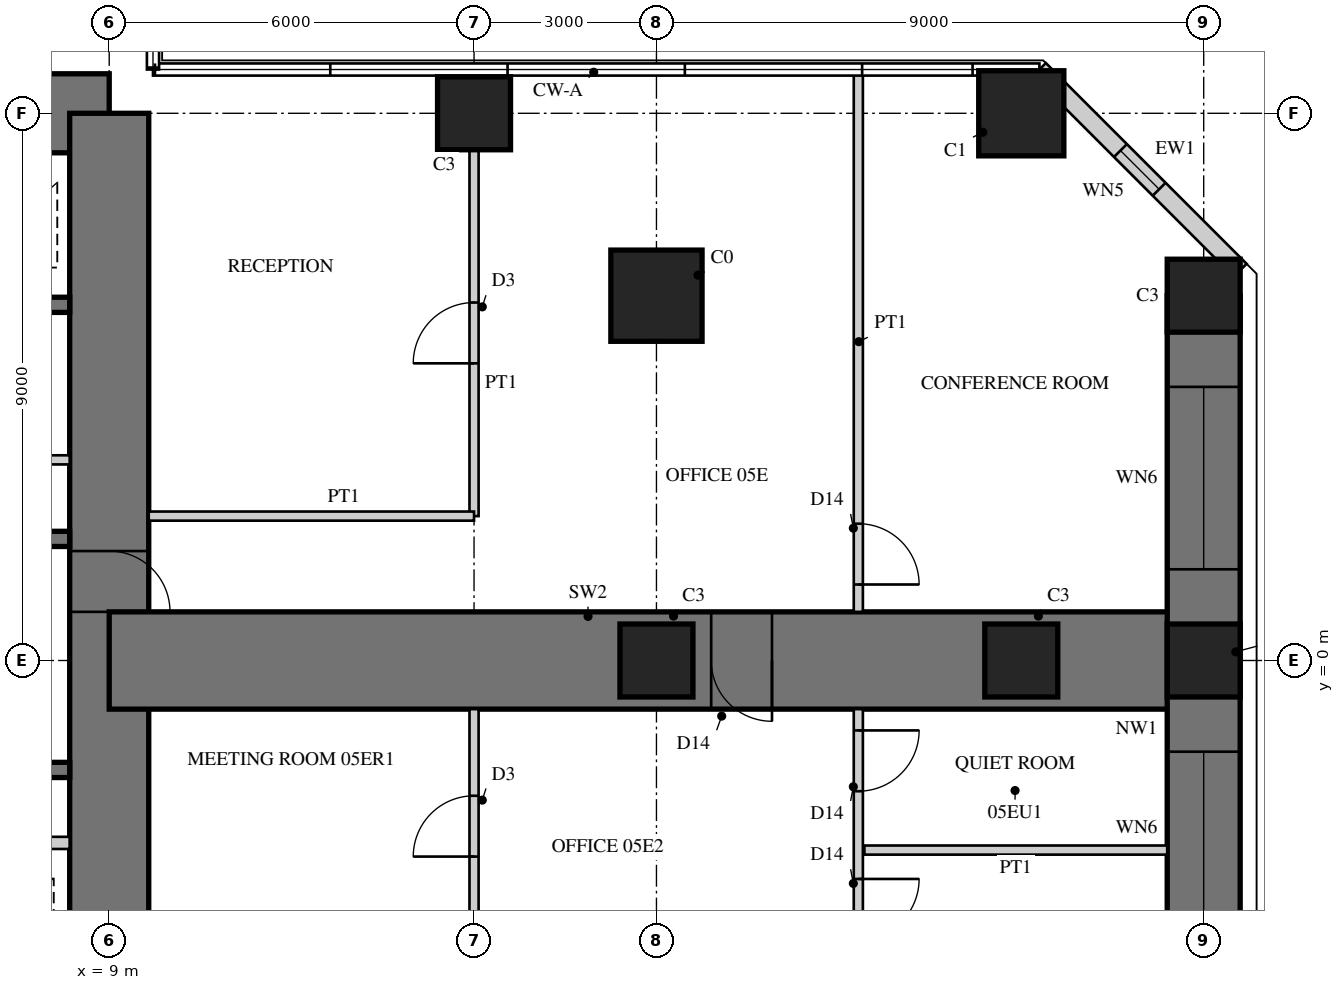
"""IFC4 building model, lengths in metres.
Left out: names, types, materials, properties, quantities, classifications, styles, units other than length and angle.
Written with IfcOpenShell. Run it as: python <this file> out.ifc"""

import sys

from ifc_helpers import new_model, si_unit, direction, frame, frame_2d, origin, origin_2d, place, context, subcontext, project, spatial, rectangle, hollow_rectangle, extrude, element, fill, save


model = new_model("IFC4")
c1 = context("Model", 3, precision=1e-05, world=origin(), true_north=direction((0.0, 1.0)))
c2 = subcontext(c1, "Body", "Model", "MODEL_VIEW")
j1 = project(units=[si_unit("LENGTHUNIT", "METRE"), si_unit("PLANEANGLEUNIT", "RADIAN")], contexts=[c1])
p1 = place(None, origin())
s1 = spatial("IfcSite", under=j1, at=p1, CompositionType="ELEMENT")
p2 = place(p1, origin())
s2 = spatial("IfcBuilding", under=s1, at=p2, CompositionType="ELEMENT")
p3 = place(p2, frame((0.0, 0.0, 23.5)))
s3 = spatial("IfcBuildingStorey", under=s2, at=p3, CompositionType="ELEMENT", Elevation=23.5)
p4 = place(p3, frame((9.0, 9.0, 0.0), z_axis=(0.0, 0.0, 1.0), x_axis=(-1.0, 0.0, 0.0)))
e1 = element("IfcWall", 1, at=p4, inside=s3, PredefinedType="SHEAR", context=c2, shape_type="SweptSolid", body=[
    extrude(rectangle(XDim=18.0, YDim=1.3, at=frame_2d((9.0, 0.0))), origin(), (0.0, 0.0, 1.0), 4.0),
])
p5 = place(p4, frame((9.8, 0.0, 0.0)))
e2 = element("IfcOpeningElement", 2, at=p5, cuts=e1, PredefinedType="OPENING", context=c2, shape_type="SweptSolid", body=[
    extrude(rectangle(XDim=1.0, YDim=2.4, at=frame_2d((0.5, 1.2))), frame((0.0, 0.66, 0.0), z_axis=(0.0, -1.0, 0.0), x_axis=(1.0, 0.0, 0.0)), (0.0, 0.0, 1.0), 1.32),
])
p6 = place(p3, frame((9.0, -9.0, 0.0), z_axis=(0.0, 0.0, 1.0), x_axis=(0.0, 1.0, 0.0)))
e3 = element("IfcWall", 3, at=p6, inside=s3, PredefinedType="SHEAR", context=c2, shape_type="SweptSolid", body=[
    extrude(rectangle(XDim=18.0, YDim=1.3, at=frame_2d((9.0, 0.0))), origin(), (0.0, 0.0, 1.0), 4.0),
])
p7 = place(p6, frame((9.8, 0.0, 0.0)))
e4 = element("IfcOpeningElement", 4, at=p7, cuts=e3, PredefinedType="OPENING", context=c2, shape_type="SweptSolid", body=[
    extrude(rectangle(XDim=1.0, YDim=2.4, at=frame_2d((0.5, 1.2))), frame((0.0, 0.66, 0.0), z_axis=(0.0, -1.0, 0.0), x_axis=(1.0, 0.0, 0.0)), (0.0, 0.0, 1.0), 1.32),
])
p8 = place(p3, frame((1.925, 2.0, 0.0), z_axis=(0.0, 0.0, 1.0), x_axis=(1.0, 0.0, 0.0)))
e5 = element("IfcWall", 5, at=p8, inside=s3, PredefinedType="SHEAR", context=c2, shape_type="SweptSolid", body=[
    extrude(rectangle(XDim=6.425, YDim=0.25, at=frame_2d((3.212, 0.0))), origin(), (0.0, 0.0, 1.0), 4.0),
])
p9 = place(p3, frame((1.925, 5.85, 0.0), z_axis=(0.0, 0.0, 1.0), x_axis=(1.0, 0.0, 0.0)))
e6 = element("IfcWall", 6, at=p9, inside=s3, PredefinedType="SHEAR", context=c2, shape_type="SweptSolid", body=[
    extrude(rectangle(XDim=6.425, YDim=0.25, at=frame_2d((3.212, 0.0))), origin(), (0.0, 0.0, 1.0), 4.0),
])
p10 = place(p9, frame((0.454, 0.0, 0.0)))
e7 = element("IfcOpeningElement", 7, at=p10, cuts=e6, PredefinedType="OPENING", context=c2, shape_type="SweptSolid", body=[
    extrude(rectangle(XDim=1.1, YDim=2.2, at=frame_2d((0.55, 1.1))), frame((0.0, 0.135, 0.0), z_axis=(0.0, -1.0, 0.0), x_axis=(1.0, 0.0, 0.0)), (0.0, 0.0, 1.0), 0.27),
])
p11 = place(p9, frame((2.663, 0.0, 0.0)))
e8 = element("IfcOpeningElement", 8, at=p11, cuts=e6, PredefinedType="OPENING", context=c2, shape_type="SweptSolid", body=[
    extrude(rectangle(XDim=1.1, YDim=2.2, at=frame_2d((0.55, 1.1))), frame((0.0, 0.135, 0.0), z_axis=(0.0, -1.0, 0.0), x_axis=(1.0, 0.0, 0.0)), (0.0, 0.0, 1.0), 0.27),
])
p12 = place(p9, frame((4.871, 0.0, 0.0)))
e9 = element("IfcOpeningElement", 9, at=p12, cuts=e6, PredefinedType="OPENING", context=c2, shape_type="SweptSolid", body=[
    extrude(rectangle(XDim=1.1, YDim=2.2, at=frame_2d((0.55, 1.1))), frame((0.0, 0.135, 0.0), z_axis=(0.0, -1.0, 0.0), x_axis=(1.0, 0.0, 0.0)), (0.0, 0.0, 1.0), 0.27),
])
p13 = place(p3, frame((1.925, 3.3, 0.0), z_axis=(0.0, 0.0, 1.0), x_axis=(1.0, 0.0, 0.0)))
e10 = element("IfcWall", 10, at=p13, inside=s3, PredefinedType="PARTITIONING", context=c2, shape_type="SweptSolid", body=[
    extrude(rectangle(XDim=6.425, YDim=0.15, at=frame_2d((3.212, 0.0))), origin(), (0.0, 0.0, 1.0), 4.0),
])
p14 = place(p13, frame((0.075, 0.0, 0.0)))
e11 = element("IfcOpeningElement", 11, at=p14, cuts=e10, PredefinedType="OPENING", context=c2, shape_type="SweptSolid", body=[
    extrude(rectangle(XDim=0.8, YDim=2.1, at=frame_2d((0.4, 1.05))), frame((0.0, 0.085, 0.0), z_axis=(0.0, -1.0, 0.0), x_axis=(1.0, 0.0, 0.0)), (0.0, 0.0, 1.0), 0.17),
])
p15 = place(p13, frame((3.675, 0.0, 0.0)))
e12 = element("IfcOpeningElement", 12, at=p15, cuts=e10, PredefinedType="OPENING", context=c2, shape_type="SweptSolid", body=[
    extrude(rectangle(XDim=0.8, YDim=2.1, at=frame_2d((0.4, 1.05))), frame((0.0, 0.085, 0.0), z_axis=(0.0, -1.0, 0.0), x_axis=(1.0, 0.0, 0.0)), (0.0, 0.0, 1.0), 0.17),
])
p16 = place(p3, frame((2.125, -1.8, 0.0), z_axis=(0.0, 0.0, 1.0), x_axis=(1.0, 0.0, 0.0)))
e13 = element("IfcWall", 13, at=p16, inside=s3, PredefinedType="SHEAR", context=c2, shape_type="SweptSolid", body=[
    extrude(rectangle(XDim=6.225, YDim=0.25, at=frame_2d((3.113, 0.0))), origin(), (0.0, 0.0, 1.0), 4.0),
])
p17 = place(p3, frame((5.725, -3.0, 0.0), z_axis=(0.0, 0.0, 1.0), x_axis=(1.0, 0.0, 0.0)))
e14 = element("IfcWall", 14, at=p17, inside=s3, PredefinedType="PARTITIONING", context=c2, shape_type="SweptSolid", body=[
    extrude(rectangle(XDim=2.625, YDim=0.2, at=frame_2d((1.312, 0.0))), origin(), (0.0, 0.0, 1.0), 4.0),
])
p18 = place(p3, frame((9.0, 0.0, 0.0), z_axis=(0.0, 0.0, 1.0), x_axis=(1.0, 0.0, 0.0)))
e15 = element("IfcWall", 15, at=p18, inside=s3, PredefinedType="SHEAR", context=c2, shape_type="SweptSolid", body=[
    extrude(rectangle(XDim=18.0, YDim=1.6, at=frame_2d((9.0, 0.0))), origin(), (0.0, 0.0, 1.0), 4.0),
])
p19 = place(p18, frame((9.9, 0.0, 0.0)))
e16 = element("IfcOpeningElement", 16, at=p19, cuts=e15, PredefinedType="OPENING", context=c2, shape_type="SweptSolid", body=[
    extrude(rectangle(XDim=1.0, YDim=2.2, at=frame_2d((0.5, 1.1))), frame((0.0, 0.81, 0.0), z_axis=(0.0, -1.0, 0.0), x_axis=(1.0, 0.0, 0.0)), (0.0, 0.0, 1.0), 1.62),
])
p20 = place(p3, frame((27.0, -6.0, 0.0), z_axis=(0.0, 0.0, 1.0), x_axis=(0.0, 1.0, 0.0)))
e17 = element("IfcWall", 17, at=p20, inside=s3, PredefinedType="SHEAR", context=c2, shape_type="SweptSolid", body=[
    extrude(rectangle(XDim=12.0, YDim=1.2, at=frame_2d((6.0, 0.0))), origin(), (0.0, 0.0, 1.0), 4.0),
])
p21 = place(p20, frame((1.5, 0.0, 0.6)))
e18 = element("IfcOpeningElement", 18, at=p21, cuts=e17, PredefinedType="OPENING", context=c2, shape_type="SweptSolid", body=[
    extrude(rectangle(XDim=3.0, YDim=2.4, at=frame_2d((1.5, 1.2))), frame((0.0, 0.61, 0.0), z_axis=(0.0, -1.0, 0.0), x_axis=(1.0, 0.0, 0.0)), (0.0, 0.0, 1.0), 1.22),
])
p22 = place(p20, frame((7.5, 0.0, 0.6)))
e19 = element("IfcOpeningElement", 19, at=p22, cuts=e17, PredefinedType="OPENING", context=c2, shape_type="SweptSolid", body=[
    extrude(rectangle(XDim=3.0, YDim=2.4, at=frame_2d((1.5, 1.2))), frame((0.0, 0.61, 0.0), z_axis=(0.0, -1.0, 0.0), x_axis=(1.0, 0.0, 0.0)), (0.0, 0.0, 1.0), 1.22),
])
p23 = place(p3, frame((15.0, 9.0, 0.0), z_axis=(0.0, 0.0, 1.0), x_axis=(1.0, 0.0, 0.0)))
e20 = element("IfcColumn", 20, at=p23, inside=s3, PredefinedType="COLUMN", context=c2, shape_type="SweptSolid", body=[
    extrude(rectangle(XDim=1.2, YDim=1.2, at=origin_2d()), origin(), (0.0, 0.0, 1.0), 4.0),
])
p24 = place(p3, frame((24.0, 9.0, 0.0), z_axis=(0.0, 0.0, 1.0), x_axis=(1.0, 0.0, 0.0)))
e21 = element("IfcColumn", 21, at=p24, inside=s3, PredefinedType="COLUMN", context=c2, shape_type="SweptSolid", body=[
    extrude(rectangle(XDim=1.4, YDim=1.4, at=origin_2d()), origin(), (0.0, 0.0, 1.0), 4.0),
])
for number, where, z_axis, x_axis in (
    (22, (27.0, 0.0, 0.0), (0.0, 0.0, 1.0), (1.0, 0.0, 0.0)),
    (23, (27.0, 6.0, 0.0), (0.0, 0.0, 1.0), (1.0, 0.0, 0.0)),
    (24, (18.0, 0.0, 0.0), (0.0, 0.0, 1.0), (1.0, 0.0, 0.0)),
):
    element("IfcColumn", number, at=place(p3, frame(where, z_axis=z_axis, x_axis=x_axis)), inside=s3, PredefinedType="COLUMN", context=c2, shape_type="SweptSolid", body=[
        extrude(rectangle(XDim=1.2, YDim=1.2, at=origin_2d()), origin(), (0.0, 0.0, 1.0), 4.0),
    ])
p25 = place(p3, frame((18.0, 6.0, -0.2), z_axis=(0.0, 0.0, 1.0), x_axis=(1.0, 0.0, 0.0)))
e25 = element("IfcColumn", 25, at=p25, inside=s3, PredefinedType="COLUMN", context=c2, shape_type="SweptSolid", body=[
    extrude(rectangle(XDim=1.5, YDim=1.5, at=origin_2d()), origin(), (0.0, 0.0, 1.0), 4.2),
])
p26 = place(p3, frame((24.0, 0.0, 0.0), z_axis=(0.0, 0.0, 1.0), x_axis=(1.0, 0.0, 0.0)))
e26 = element("IfcColumn", 26, at=p26, inside=s3, PredefinedType="COLUMN", context=c2, shape_type="SweptSolid", body=[
    extrude(rectangle(XDim=1.2, YDim=1.2, at=origin_2d()), origin(), (0.0, 0.0, 1.0), 4.0),
])
p27 = place(p3, frame((27.6, 6.418, 0.0), z_axis=(0.0, 0.0, 1.0), x_axis=(-0.707106781187, 0.707106781187, 0.0)))
e27 = element("IfcWall", 27, at=p27, inside=s3, PredefinedType="SOLIDWALL", context=c2, shape_type="SweptSolid", body=[
    extrude(rectangle(XDim=4.669, YDim=0.3, at=frame_2d((2.335, 0.0))), origin(), (0.0, 0.0, 1.0), 3.8),
])
p28 = place(p27, frame((1.885, 0.0, 0.3)))
e28 = element("IfcOpeningElement", 28, at=p28, cuts=e27, PredefinedType="OPENING", context=c2, shape_type="SweptSolid", body=[
    extrude(rectangle(XDim=0.9, YDim=2.4, at=frame_2d((0.45, 1.2))), frame((0.0, 0.16, 0.0), z_axis=(0.0, -1.0, 0.0), x_axis=(1.0, 0.0, 0.0)), (0.0, 0.0, 1.0), 0.32),
])
p29 = place(p3, frame((15.0, 2.375, 0.0), z_axis=(0.0, 0.0, 1.0), x_axis=(0.0, 1.0, 0.0)))
e29 = element("IfcWall", 29, at=p29, inside=s3, PredefinedType="PARTITIONING", context=c2, shape_type="SweptSolid", body=[
    extrude(rectangle(XDim=6.025, YDim=0.15, at=frame_2d((3.012, 0.0))), origin(), (0.0, 0.0, 1.0), 2.95),
])
p30 = place(p29, frame((2.512, 0.0, 0.0)))
e30 = element("IfcOpeningElement", 30, at=p30, cuts=e29, PredefinedType="OPENING", context=c2, shape_type="SweptSolid", body=[
    extrude(rectangle(XDim=1.0, YDim=2.1, at=frame_2d((0.5, 1.05))), frame((0.0, 0.085, 0.0), z_axis=(0.0, -1.0, 0.0), x_axis=(1.0, 0.0, 0.0)), (0.0, 0.0, 1.0), 0.17),
])
p31 = place(p3, frame((9.65, 2.375, 0.0), z_axis=(0.0, 0.0, 1.0), x_axis=(1.0, 0.0, 0.0)))
e31 = element("IfcWall", 31, at=p31, inside=s3, PredefinedType="PARTITIONING", context=c2, shape_type="SweptSolid", body=[
    extrude(rectangle(XDim=5.35, YDim=0.15, at=frame_2d((2.675, 0.0))), origin(), (0.0, 0.0, 1.0), 3.8),
])
p32 = place(p3, frame((15.0, -8.4, 0.0), z_axis=(0.0, 0.0, 1.0), x_axis=(0.0, 1.0, 0.0)))
e32 = element("IfcWall", 32, at=p32, inside=s3, PredefinedType="PARTITIONING", context=c2, shape_type="SweptSolid", body=[
    extrude(rectangle(XDim=7.6, YDim=0.15, at=frame_2d((3.8, 0.0))), origin(), (0.0, 0.0, 1.0), 2.95),
])
p33 = place(p32, frame((1.375, 0.0, 0.0)))
e33 = element("IfcOpeningElement", 33, at=p33, cuts=e32, PredefinedType="OPENING", context=c2, shape_type="SweptSolid", body=[
    extrude(rectangle(XDim=1.0, YDim=2.1, at=frame_2d((0.5, 1.05))), frame((0.0, 0.085, 0.0), z_axis=(0.0, -1.0, 0.0), x_axis=(1.0, 0.0, 0.0)), (0.0, 0.0, 1.0), 0.17),
])
p34 = place(p32, frame((5.175, 0.0, 0.0)))
e34 = element("IfcOpeningElement", 34, at=p34, cuts=e32, PredefinedType="OPENING", context=c2, shape_type="SweptSolid", body=[
    extrude(rectangle(XDim=1.0, YDim=2.1, at=frame_2d((0.5, 1.05))), frame((0.0, 0.085, 0.0), z_axis=(0.0, -1.0, 0.0), x_axis=(1.0, 0.0, 0.0)), (0.0, 0.0, 1.0), 0.17),
])
p35 = place(p3, frame((21.32, 0.8, 0.0), z_axis=(0.0, 0.0, 1.0), x_axis=(0.0, 1.0, 0.0)))
e35 = element("IfcWall", 35, at=p35, inside=s3, PredefinedType="PARTITIONING", context=c2, shape_type="SweptSolid", body=[
    extrude(rectangle(XDim=8.88, YDim=0.15, at=frame_2d((4.44, 0.0))), origin(), (0.0, 0.0, 1.0), 3.8),
])
p36 = place(p35, frame((0.45, 0.0, 0.0)))
e36 = element("IfcOpeningElement", 36, at=p36, cuts=e35, PredefinedType="OPENING", context=c2, shape_type="SweptSolid", body=[
    extrude(rectangle(XDim=1.0, YDim=2.2, at=frame_2d((0.5, 1.1))), frame((0.0, 0.085, 0.0), z_axis=(0.0, -1.0, 0.0), x_axis=(1.0, 0.0, 0.0)), (0.0, 0.0, 1.0), 0.17),
])
p37 = place(p3, frame((21.42, -3.118, 0.0), z_axis=(0.0, 0.0, 1.0), x_axis=(1.0, 0.0, 0.0)))
e37 = element("IfcWall", 37, at=p37, inside=s3, PredefinedType="PARTITIONING", context=c2, shape_type="SweptSolid", body=[
    extrude(rectangle(XDim=4.98, YDim=0.15, at=frame_2d((2.49, 0.0))), origin(), (0.0, 0.0, 1.0), 3.8),
])
p38 = place(p3, frame((21.32, -9.68, 0.0), z_axis=(0.0, 0.0, 1.0), x_axis=(0.0, 1.0, 0.0)))
e38 = element("IfcWall", 38, at=p38, inside=s3, PredefinedType="PARTITIONING", context=c2, shape_type="SweptSolid", body=[
    extrude(rectangle(XDim=8.88, YDim=0.15, at=frame_2d((4.44, 0.0))), origin(), (0.0, 0.0, 1.0), 3.8),
])
p39 = place(p38, frame((5.087, 0.0, 0.0)))
e39 = element("IfcOpeningElement", 39, at=p39, cuts=e38, PredefinedType="OPENING", context=c2, shape_type="SweptSolid", body=[
    extrude(rectangle(XDim=1.0, YDim=2.2, at=frame_2d((0.5, 1.1))), frame((0.0, 0.085, 0.0), z_axis=(0.0, -1.0, 0.0), x_axis=(1.0, 0.0, 0.0)), (0.0, 0.0, 1.0), 0.17),
])
p40 = place(p38, frame((7.53, 0.0, 0.0)))
e40 = element("IfcOpeningElement", 40, at=p40, cuts=e38, PredefinedType="OPENING", context=c2, shape_type="SweptSolid", body=[
    extrude(rectangle(XDim=1.0, YDim=2.2, at=frame_2d((0.5, 1.1))), frame((0.0, 0.085, 0.0), z_axis=(0.0, -1.0, 0.0), x_axis=(1.0, 0.0, 0.0)), (0.0, 0.0, 1.0), 0.17),
])
p41 = place(p21, origin())
e41 = element("IfcWindow", 41, at=p41, inside=s3, PartitioningType="SINGLE_PANEL", PredefinedType="WINDOW", context=c2, shape_type="SweptSolid", body=[
    extrude(hollow_rectangle(XDim=3.0, YDim=2.4, WallThickness=0.06, at=frame_2d((1.5, 1.2))), frame((0.0, 0.03, 0.0), z_axis=(0.0, -1.0, 0.0), x_axis=(1.0, 0.0, 0.0)), (0.0, 0.0, 1.0), 0.06),
    extrude(rectangle(XDim=2.879, YDim=2.279, at=frame_2d((1.5, 1.2))), frame((0.0, 0.03, 0.0), z_axis=(0.0, -1.0, 0.0), x_axis=(1.0, 0.0, 0.0)), (0.0, 0.0, 1.0), 0.06),
])
fill(e18, e41)
p42 = place(p22, origin())
e42 = element("IfcWindow", 42, at=p42, inside=s3, PartitioningType="SINGLE_PANEL", PredefinedType="WINDOW", context=c2, shape_type="SweptSolid", body=[
    extrude(hollow_rectangle(XDim=3.0, YDim=2.4, WallThickness=0.06, at=frame_2d((1.5, 1.2))), frame((0.0, 0.03, 0.0), z_axis=(0.0, -1.0, 0.0), x_axis=(1.0, 0.0, 0.0)), (0.0, 0.0, 1.0), 0.06),
    extrude(rectangle(XDim=2.879, YDim=2.279, at=frame_2d((1.5, 1.2))), frame((0.0, 0.03, 0.0), z_axis=(0.0, -1.0, 0.0), x_axis=(1.0, 0.0, 0.0)), (0.0, 0.0, 1.0), 0.06),
])
fill(e19, e42)
p43 = place(p28, origin())
e43 = element("IfcWindow", 43, at=p43, inside=s3, PartitioningType="SINGLE_PANEL", PredefinedType="WINDOW", context=c2, shape_type="SweptSolid", body=[
    extrude(hollow_rectangle(XDim=0.9, YDim=2.4, WallThickness=0.06, at=frame_2d((0.45, 1.2))), frame((0.0, 0.03, 0.0), z_axis=(0.0, -1.0, 0.0), x_axis=(1.0, 0.0, 0.0)), (0.0, 0.0, 1.0), 0.06),
    extrude(rectangle(XDim=0.779, YDim=2.279, at=frame_2d((0.45, 1.2))), frame((0.0, 0.03, 0.0), z_axis=(0.0, -1.0, 0.0), x_axis=(1.0, 0.0, 0.0)), (0.0, 0.0, 1.0), 0.06),
])
fill(e28, e43)
p44 = place(p30, origin())
e44 = element("IfcDoor", 44, at=p44, inside=s3, OperationType="SINGLE_SWING_LEFT", PredefinedType="DOOR", context=c2, shape_type="SweptSolid", body=[
    extrude(rectangle(XDim=1.0, YDim=2.1, at=frame_2d((0.5, 1.05))), frame((0.0, 0.025, 0.0), z_axis=(0.0, -1.0, 0.0), x_axis=(1.0, 0.0, 0.0)), (0.0, 0.0, 1.0), 0.05),
])
fill(e30, e44)
p45 = place(p34, origin())
e45 = element("IfcDoor", 45, at=p45, inside=s3, OperationType="SINGLE_SWING_LEFT", PredefinedType="DOOR", context=c2, shape_type="SweptSolid", body=[
    extrude(rectangle(XDim=1.0, YDim=2.1, at=frame_2d((0.5, 1.05))), frame((0.0, 0.025, 0.0), z_axis=(0.0, -1.0, 0.0), x_axis=(1.0, 0.0, 0.0)), (0.0, 0.0, 1.0), 0.05),
])
fill(e34, e45)
p46 = place(p36, frame((1.0, 0.0, 0.0), z_axis=(0.0, 0.0, 1.0), x_axis=(-1.0, 0.0, 0.0)))
e46 = element("IfcDoor", 46, at=p46, inside=s3, OperationType="SINGLE_SWING_RIGHT", PredefinedType="DOOR", context=c2, shape_type="SweptSolid", body=[
    extrude(rectangle(XDim=1.0, YDim=2.2, at=frame_2d((0.5, 1.1))), frame((0.0, 0.025, 0.0), z_axis=(0.0, -1.0, 0.0), x_axis=(1.0, 0.0, 0.0)), (0.0, 0.0, 1.0), 0.05),
])
fill(e36, e46)
p47 = place(p39, frame((1.0, 0.0, 0.0), z_axis=(0.0, 0.0, 1.0), x_axis=(-1.0, 0.0, 0.0)))
e47 = element("IfcDoor", 47, at=p47, inside=s3, OperationType="SINGLE_SWING_LEFT", PredefinedType="DOOR", context=c2, shape_type="SweptSolid", body=[
    extrude(rectangle(XDim=1.0, YDim=2.2, at=frame_2d((0.5, 1.1))), frame((0.0, 0.025, 0.0), z_axis=(0.0, -1.0, 0.0), x_axis=(1.0, 0.0, 0.0)), (0.0, 0.0, 1.0), 0.05),
])
fill(e39, e47)
p48 = place(p40, frame((1.0, 0.0, 0.0), z_axis=(0.0, 0.0, 1.0), x_axis=(-1.0, 0.0, 0.0)))
e48 = element("IfcDoor", 48, at=p48, inside=s3, OperationType="SINGLE_SWING_LEFT", PredefinedType="DOOR", context=c2, shape_type="SweptSolid", body=[
    extrude(rectangle(XDim=1.0, YDim=2.2, at=frame_2d((0.5, 1.1))), frame((0.0, 0.025, 0.0), z_axis=(0.0, -1.0, 0.0), x_axis=(1.0, 0.0, 0.0)), (0.0, 0.0, 1.0), 0.05),
])
fill(e40, e48)
p49 = place(p19, frame((1.0, 0.0, 0.0), z_axis=(0.0, 0.0, 1.0), x_axis=(-1.0, 0.0, 0.0)))
e49 = element("IfcDoor", 49, at=p49, inside=s3, OperationType="SINGLE_SWING_LEFT", PredefinedType="DOOR", context=c2, shape_type="SweptSolid", body=[
    extrude(rectangle(XDim=1.0, YDim=2.2, at=frame_2d((0.5, 1.1))), frame((0.0, 0.025, 0.0), z_axis=(0.0, -1.0, 0.0), x_axis=(1.0, 0.0, 0.0)), (0.0, 0.0, 1.0), 0.05),
])
fill(e16, e49)
p50 = place(p7, frame((1.0, 0.0, 0.0), z_axis=(0.0, 0.0, 1.0), x_axis=(-1.0, 0.0, 0.0)))
e50 = element("IfcDoor", 50, at=p50, inside=s3, OperationType="SINGLE_SWING_RIGHT", PredefinedType="DOOR", context=c2, shape_type="SweptSolid", body=[
    extrude(rectangle(XDim=1.0, YDim=2.4, at=frame_2d((0.5, 1.2))), frame((0.0, -0.005, 0.0), z_axis=(0.0, -1.0, 0.0), x_axis=(1.0, 0.0, 0.0)), (0.0, 0.0, 1.0), 0.05),
])
fill(e4, e50)
save(model, sys.argv[1])
